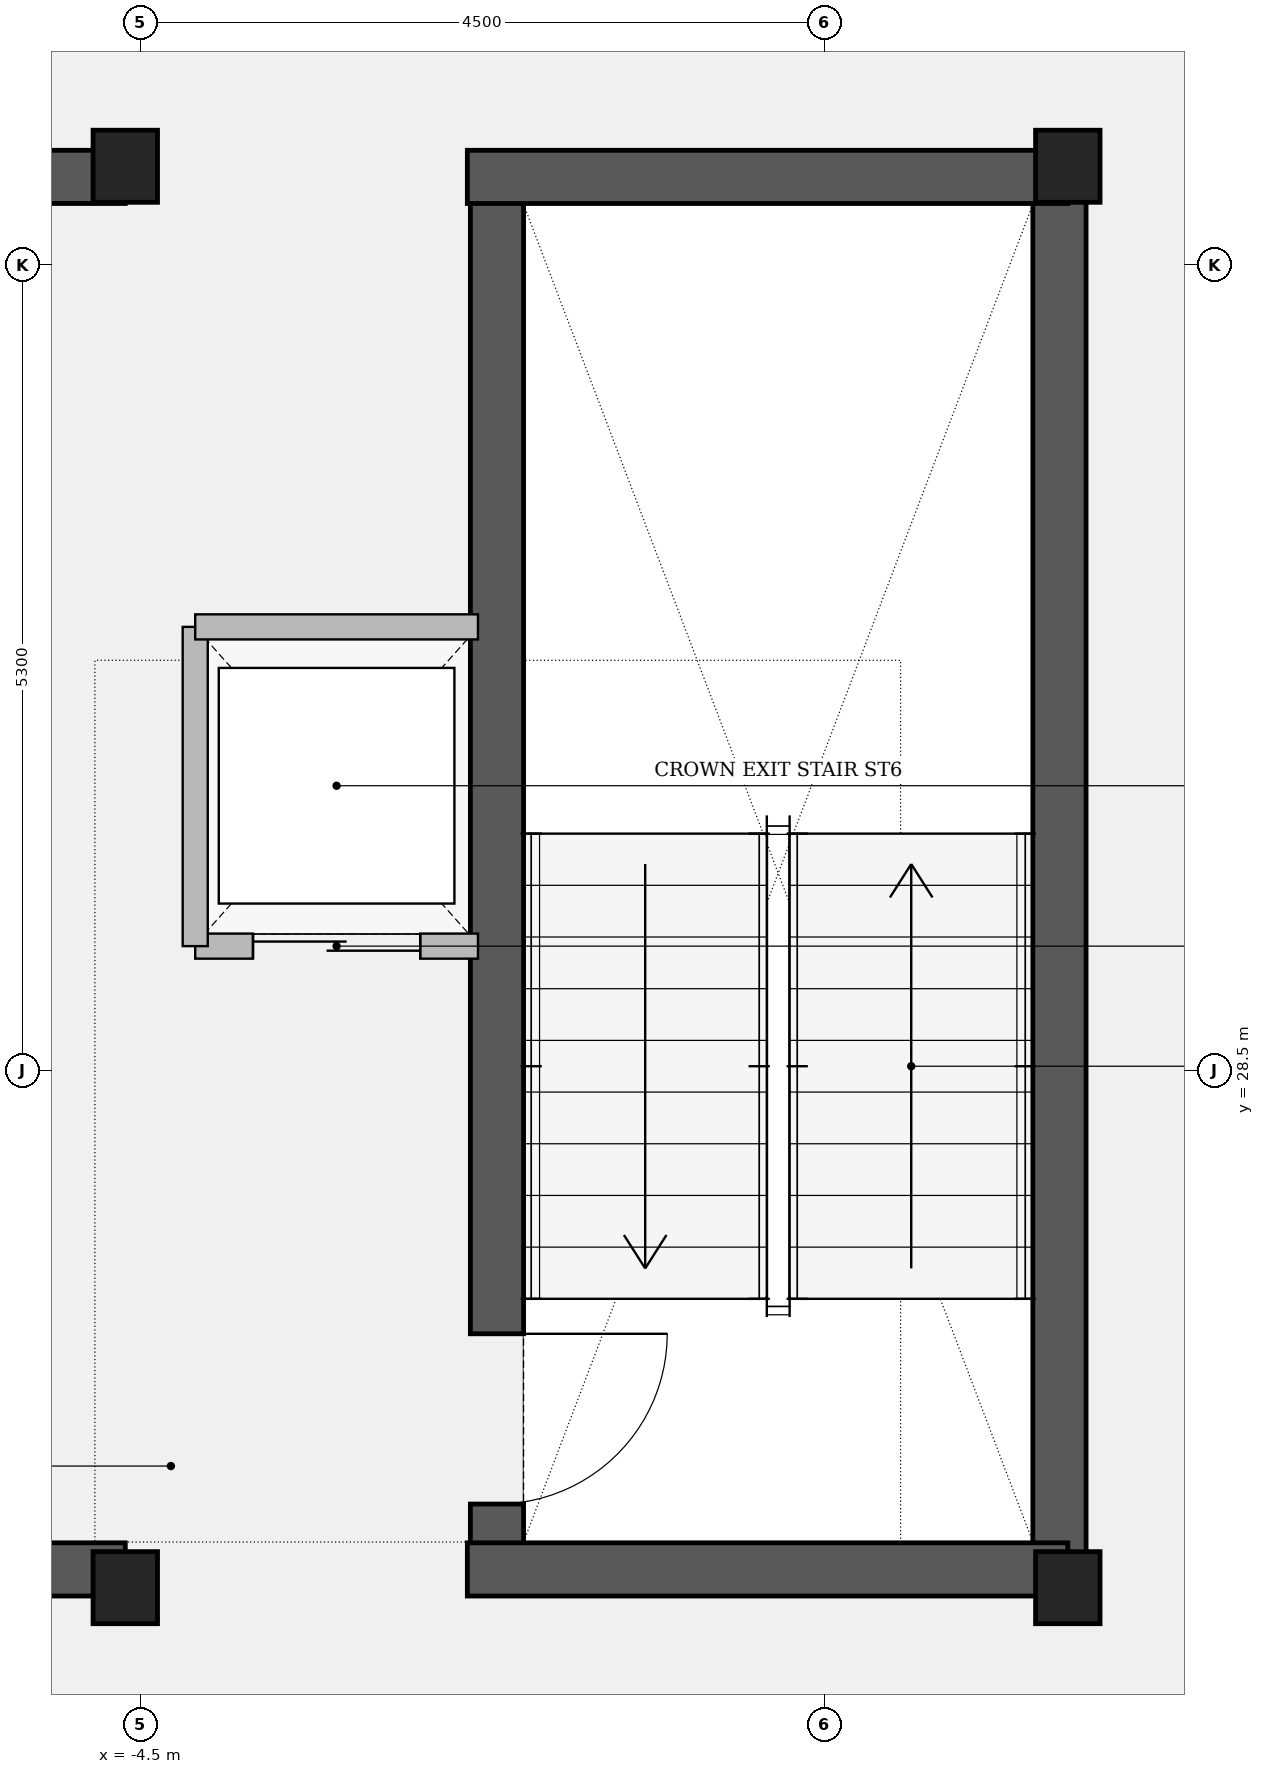
"""IFC4 building model, lengths in metres.
Left out: names, types, materials, properties, quantities, classifications, styles, units other than length and angle.
Written with IfcOpenShell. Run it as: python <this file> out.ifc"""

import sys

from ifc_helpers import new_model, si_unit, direction, frame, frame_2d, origin, origin_2d, place, context, subcontext, project, spatial, rectangle, i_section, extrude, element, fill, save


model = new_model("IFC4")
c1 = context("Model", 3, precision=1e-05, world=origin(), true_north=direction((0.0, 1.0)))
c2 = subcontext(c1, "Body", "Model", "MODEL_VIEW")
j1 = project(units=[si_unit("LENGTHUNIT", "METRE"), si_unit("PLANEANGLEUNIT", "RADIAN")], contexts=[c1])
p1 = place(None, origin())
s1 = spatial("IfcSite", under=j1, at=p1, CompositionType="ELEMENT")
p2 = place(p1, origin())
s2 = spatial("IfcBuilding", under=s1, at=p2, CompositionType="ELEMENT")
p3 = place(p2, frame((0.0, 0.0, 304.85)))
s3 = spatial("IfcBuildingStorey", under=s2, at=p3, CompositionType="ELEMENT", Elevation=304.85)
for number, where, z_axis, x_axis in (
    (1, (-9.45, 25.22, -0.19), (0.0, 0.0, 1.0), (1.0, 0.0, 0.0)),
    (2, (-9.45, 34.38, -0.19), (0.0, 0.0, 1.0), (1.0, 0.0, 0.0)),
):
    element("IfcWall", number, at=place(p3, frame(where, z_axis=z_axis, x_axis=x_axis)), inside=s3, PredefinedType="SHEAR", context=c2, shape_type="SweptSolid", body=[
        extrude(rectangle(XDim=4.85, YDim=0.35, at=frame_2d((2.425, 0.0))), origin(), (0.0, 0.0, 1.0), 3.8),
    ])
p4 = place(p3, frame((-2.155, 34.45, -0.19), z_axis=(0.0, 0.0, 1.0), x_axis=(0.0, -1.0, 0.0)))
e3 = element("IfcWall", 3, at=p4, inside=s3, PredefinedType="SHEAR", context=c2, shape_type="SweptSolid", body=[
    extrude(rectangle(XDim=9.35, YDim=0.35, at=frame_2d((4.675, 0.0))), origin(), (0.0, 0.0, 1.0), 3.8),
])
p5 = place(p4, frame((7.68, 0.0, 0.19)))
e4 = element("IfcOpeningElement", 4, at=p5, cuts=e3, PredefinedType="OPENING", context=c2, shape_type="SweptSolid", body=[
    extrude(rectangle(XDim=1.12, YDim=2.22, at=frame_2d((0.56, 1.11))), frame((0.0, 0.185, 0.0), z_axis=(0.0, -1.0, 0.0), x_axis=(1.0, 0.0, 0.0)), (0.0, 0.0, 1.0), 0.37),
])
p6 = place(p3, frame((1.545, 25.1, -0.19), z_axis=(0.0, 0.0, 1.0), x_axis=(0.0, 1.0, 0.0)))
e5 = element("IfcWall", 5, at=p6, inside=s3, PredefinedType="SHEAR", context=c2, shape_type="SweptSolid", body=[
    extrude(rectangle(XDim=9.35, YDim=0.35, at=frame_2d((4.675, 0.0))), origin(), (0.0, 0.0, 1.0), 3.8),
])
for number, where, z_axis, x_axis in (
    (6, (-2.35, 25.22, -0.19), (0.0, 0.0, 1.0), (1.0, 0.0, 0.0)),
    (7, (-2.35, 34.38, -0.19), (0.0, 0.0, 1.0), (1.0, 0.0, 0.0)),
):
    element("IfcWall", number, at=place(p3, frame(where, z_axis=z_axis, x_axis=x_axis)), inside=s3, PredefinedType="SHEAR", context=c2, shape_type="SweptSolid", body=[
        extrude(rectangle(XDim=3.95, YDim=0.35, at=frame_2d((1.975, 0.0))), origin(), (0.0, 0.0, 1.0), 3.8),
    ])
for number, where, z_axis, x_axis in (
    (8, (-4.6, 25.1, 0.0), (0.0, 0.0, 1.0), (1.0, 0.0, 0.0)),
    (9, (1.6, 25.1, 0.0), (0.0, 0.0, 1.0), (1.0, 0.0, 0.0)),
    (10, (-4.6, 34.45, 0.0), (0.0, 0.0, 1.0), (1.0, 0.0, 0.0)),
    (11, (1.6, 34.45, 0.0), (0.0, 0.0, 1.0), (1.0, 0.0, 0.0)),
):
    element("IfcColumn", number, at=place(p3, frame(where, z_axis=z_axis, x_axis=x_axis)), inside=s3, PredefinedType="COLUMN", context=c2, shape_type="SweptSolid", body=[
        extrude(i_section(OverallWidth=0.424, OverallDepth=0.474, WebThickness=0.048, FlangeThickness=0.077, at=origin_2d()), origin(), (0.0, 0.0, 1.0), 3.8),
    ])
p7 = place(p3, frame((-4.14, 29.32, 0.0), z_axis=(0.0, 0.0, 1.0), x_axis=(1.0, 0.0, 0.0)))
e12 = element("IfcWall", 12, at=p7, inside=s3, PredefinedType="PARTITIONING", context=c2, shape_type="SweptSolid", body=[
    extrude(rectangle(XDim=1.86, YDim=0.165, at=frame_2d((0.93, 0.0))), origin(), (0.0, 0.0, 1.0), 3.56),
])
p8 = place(p7, frame((0.38, 0.0, 0.0)))
e13 = element("IfcOpeningElement", 13, at=p8, cuts=e12, PredefinedType="OPENING", context=c2, shape_type="SweptSolid", body=[
    extrude(rectangle(XDim=1.1, YDim=2.25, at=frame_2d((0.55, 1.125))), frame((0.0, 0.093, 0.0), z_axis=(0.0, -1.0, 0.0), x_axis=(1.0, 0.0, 0.0)), (0.0, 0.0, 1.0), 0.185),
])
p9 = place(p3, frame((-4.14, 29.32, 0.0), z_axis=(0.0, 0.0, 1.0), x_axis=(0.0, 1.0, 0.0)))
e14 = element("IfcWall", 14, at=p9, inside=s3, PredefinedType="PARTITIONING", context=c2, shape_type="SweptSolid", body=[
    extrude(rectangle(XDim=2.1, YDim=0.165, at=frame_2d((1.05, 0.0))), origin(), (0.0, 0.0, 1.0), 2.442),
])
p10 = place(p3, frame((-4.14, 31.42, 0.0), z_axis=(0.0, 0.0, 1.0), x_axis=(1.0, 0.0, 0.0)))
e15 = element("IfcWall", 15, at=p10, inside=s3, PredefinedType="PARTITIONING", context=c2, shape_type="SweptSolid", body=[
    extrude(rectangle(XDim=1.86, YDim=0.165, at=frame_2d((0.93, 0.0))), origin(), (0.0, 0.0, 1.0), 3.56),
])
p11 = place(p5, origin())
e16 = element("IfcDoor", 16, at=p11, inside=s3, OperationType="SINGLE_SWING_LEFT", PredefinedType="DOOR", context=c2, shape_type="SweptSolid", body=[
    extrude(rectangle(XDim=1.12, YDim=2.22, at=frame_2d((0.56, 1.11))), frame((0.0, 0.025, 0.0), z_axis=(0.0, -1.0, 0.0), x_axis=(1.0, 0.0, 0.0)), (0.0, 0.0, 1.0), 0.05),
])
fill(e4, e16)
p12 = place(p8, origin())
e17 = element("IfcDoor", 17, at=p12, inside=s3, OperationType="SLIDING_TO_LEFT", PredefinedType="DOOR", context=c2, shape_type="SweptSolid", body=[
    extrude(rectangle(XDim=1.1, YDim=2.25, at=frame_2d((0.55, 1.125))), frame((0.0, 0.025, 0.0), z_axis=(0.0, -1.0, 0.0), x_axis=(1.0, 0.0, 0.0)), (0.0, 0.0, 1.0), 0.05),
])
fill(e13, e17)
save(model, sys.argv[1])
